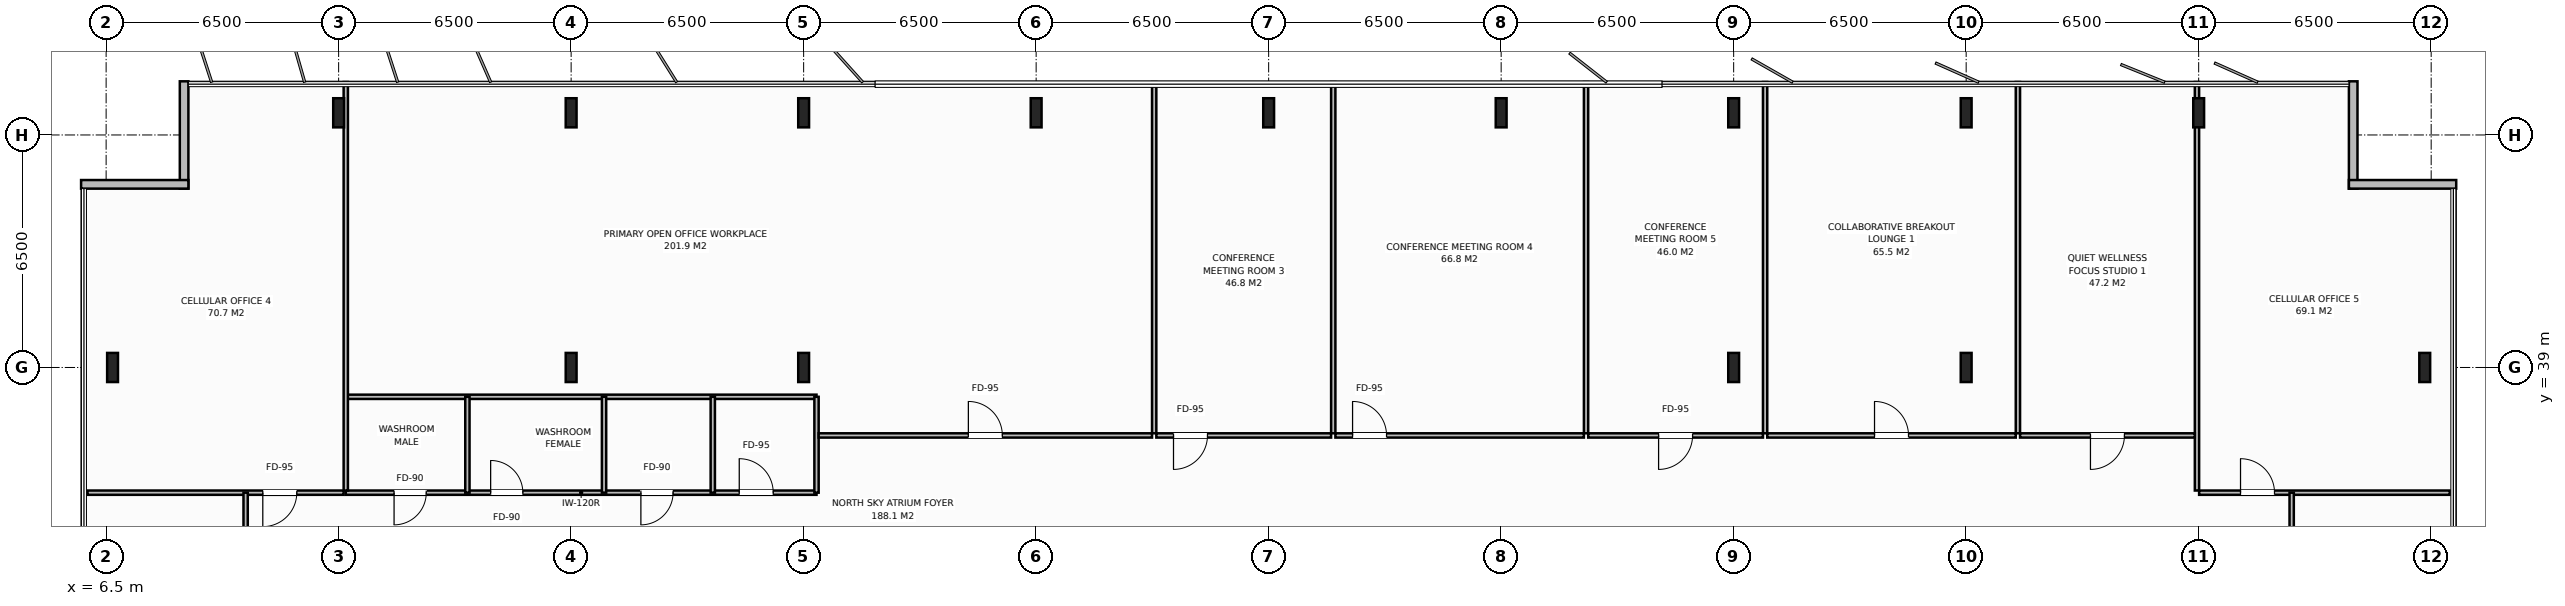
"""IFC4 building model, lengths in metres.
Left out: names, types, materials, properties, quantities, classifications, styles, units other than length and angle.
Written with IfcOpenShell. Run it as: python <this file> out.ifc"""

import sys

from ifc_helpers import new_model, si_unit, direction, frame, frame_2d, origin, origin_2d, place, context, subcontext, project, spatial, rectangle, i_section, extrude, element, fill, save


model = new_model("IFC4")
c1 = context("Model", 3, precision=1e-05, world=origin(), true_north=direction((0.0, 1.0)))
c2 = subcontext(c1, "Body", "Model", "MODEL_VIEW")
j1 = project(units=[si_unit("LENGTHUNIT", "METRE"), si_unit("PLANEANGLEUNIT", "RADIAN")], contexts=[c1])
p1 = place(None, origin())
s1 = spatial("IfcSite", under=j1, at=p1, CompositionType="ELEMENT")
p2 = place(p1, origin())
s2 = spatial("IfcBuilding", under=s1, at=p2, CompositionType="ELEMENT")
p3 = place(p2, frame((0.0, 0.0, 229.0)))
s3 = spatial("IfcBuildingStorey", under=s2, at=p3, CompositionType="ELEMENT", Elevation=229.0)
for number, where, z_axis, x_axis in (
    (1, (19.5, 39.0, 0.0), (0.0, 0.0, 1.0), (1.0, 0.0, 0.0)),
    (2, (58.5, 39.0, 0.0), (0.0, 0.0, 1.0), (1.0, 0.0, 0.0)),
    (3, (26.0, 39.0, 0.0), (0.0, 0.0, 1.0), (1.0, 0.0, 0.0)),
    (4, (52.0, 39.0, 0.0), (0.0, 0.0, 1.0), (1.0, 0.0, 0.0)),
    (5, (13.0, 46.12, 0.0), (0.0, 0.0, 1.0), (1.0, 0.0, 0.0)),
    (6, (19.5, 46.12, 0.0), (0.0, 0.0, 1.0), (1.0, 0.0, 0.0)),
    (7, (26.0, 46.12, 0.0), (0.0, 0.0, 1.0), (1.0, 0.0, 0.0)),
    (8, (32.5, 46.12, 0.0), (0.0, 0.0, 1.0), (1.0, 0.0, 0.0)),
    (9, (39.0, 46.12, 0.0), (0.0, 0.0, 1.0), (1.0, 0.0, 0.0)),
    (10, (45.5, 46.12, 0.0), (0.0, 0.0, 1.0), (1.0, 0.0, 0.0)),
    (11, (52.0, 46.12, 0.0), (0.0, 0.0, 1.0), (1.0, 0.0, 0.0)),
    (12, (58.5, 46.12, 0.0), (0.0, 0.0, 1.0), (1.0, 0.0, 0.0)),
    (13, (65.0, 46.12, 0.0), (0.0, 0.0, 1.0), (1.0, 0.0, 0.0)),
    (14, (6.68, 39.0, 0.0), (0.0, 0.0, 1.0), (1.0, 0.0, 0.0)),
    (15, (71.32, 39.0, 0.0), (0.0, 0.0, 1.0), (1.0, 0.0, 0.0)),
):
    element("IfcColumn", number, at=place(p3, frame(where, z_axis=z_axis, x_axis=x_axis)), inside=s3, PredefinedType="COLUMN", context=c2, shape_type="SweptSolid", body=[
        extrude(i_section(OverallWidth=0.303, OverallDepth=0.814, WebThickness=0.021, FlangeThickness=0.04, at=origin_2d()), origin(), (0.0, 0.0, 1.0), 3.8),
    ])
for number, where, z_axis, x_axis in (
    (16, (8.68, 44.0, 0.0), (0.0, 0.0, 1.0), (0.0, 1.0, 0.0)),
    (17, (5.8, 44.12, 0.0), (0.0, 0.0, 1.0), (1.0, 0.0, 0.0)),
    (18, (69.32, 47.0, 0.0), (0.0, 0.0, 1.0), (0.0, -1.0, 0.0)),
    (19, (69.2, 44.12, 0.0), (0.0, 0.0, 1.0), (1.0, 0.0, 0.0)),
):
    element("IfcWall", number, at=place(p3, frame(where, z_axis=z_axis, x_axis=x_axis)), inside=s3, PredefinedType="STANDARD", context=c2, shape_type="SweptSolid", body=[
        extrude(rectangle(XDim=3.0, YDim=0.24, at=frame_2d((1.5, 0.0))), origin(), (0.0, 0.0, 1.0), 3.58),
    ])
p4 = place(p3, frame((13.2, 35.5, 0.0), z_axis=(0.0, 0.0, 1.0), x_axis=(1.0, 0.0, 0.0)))
e20 = element("IfcWall", 20, at=p4, inside=s3, PredefinedType="PARTITIONING", context=c2, shape_type="SweptSolid", body=[
    extrude(rectangle(XDim=13.16, YDim=0.12, at=frame_2d((6.58, 0.0))), origin(), (0.0, 0.0, 1.0), 3.58),
])
p5 = place(p4, frame((1.35, 0.0, 0.0)))
e21 = element("IfcOpeningElement", 21, at=p5, cuts=e20, PredefinedType="OPENING", context=c2, shape_type="SweptSolid", body=[
    extrude(rectangle(XDim=0.9, YDim=2.15, at=frame_2d((0.45, 1.075))), frame((0.0, 0.07, 0.0), z_axis=(0.0, -1.0, 0.0), x_axis=(1.0, 0.0, 0.0)), (0.0, 0.0, 1.0), 0.14),
])
p6 = place(p4, frame((4.05, 0.0, 0.0)))
e22 = element("IfcOpeningElement", 22, at=p6, cuts=e20, PredefinedType="OPENING", context=c2, shape_type="SweptSolid", body=[
    extrude(rectangle(XDim=0.9, YDim=2.15, at=frame_2d((0.45, 1.075))), frame((0.0, 0.07, 0.0), z_axis=(0.0, -1.0, 0.0), x_axis=(1.0, 0.0, 0.0)), (0.0, 0.0, 1.0), 0.14),
])
p7 = place(p4, frame((8.25, 0.0, 0.0)))
e23 = element("IfcOpeningElement", 23, at=p7, cuts=e20, PredefinedType="OPENING", context=c2, shape_type="SweptSolid", body=[
    extrude(rectangle(XDim=0.9, YDim=2.15, at=frame_2d((0.45, 1.075))), frame((0.0, 0.07, 0.0), z_axis=(0.0, -1.0, 0.0), x_axis=(1.0, 0.0, 0.0)), (0.0, 0.0, 1.0), 0.14),
])
p8 = place(p4, frame((11.0, 0.0, 0.0)))
e24 = element("IfcOpeningElement", 24, at=p8, cuts=e20, PredefinedType="OPENING", context=c2, shape_type="SweptSolid", body=[
    extrude(rectangle(XDim=0.95, YDim=2.15, at=frame_2d((0.475, 1.075))), frame((0.0, 0.07, 0.0), z_axis=(0.0, -1.0, 0.0), x_axis=(1.0, 0.0, 0.0)), (0.0, 0.0, 1.0), 0.14),
])
p9 = place(p3, frame((13.2, 38.18, 0.0), z_axis=(0.0, 0.0, 1.0), x_axis=(1.0, 0.0, 0.0)))
e25 = element("IfcWall", 25, at=p9, inside=s3, PredefinedType="PARTITIONING", context=c2, shape_type="SweptSolid", body=[
    extrude(rectangle(XDim=13.16, YDim=0.12, at=frame_2d((6.58, 0.0))), origin(), (0.0, 0.0, 1.0), 3.58),
])
for number, where, z_axis, x_axis in (
    (26, (16.6, 35.5, 0.0), (0.0, 0.0, 1.0), (0.0, 1.0, 0.0)),
    (27, (20.42, 35.5, 0.0), (0.0, 0.0, 1.0), (0.0, 1.0, 0.0)),
    (28, (23.46, 35.5, 0.0), (0.0, 0.0, 1.0), (0.0, 1.0, 0.0)),
    (29, (26.36, 35.5, 0.0), (0.0, 0.0, 1.0), (0.0, 1.0, 0.0)),
):
    element("IfcWall", number, at=place(p3, frame(where, z_axis=z_axis, x_axis=x_axis)), inside=s3, PredefinedType="PARTITIONING", context=c2, shape_type="SweptSolid", body=[
        extrude(rectangle(XDim=2.68, YDim=0.12, at=frame_2d((1.34, 0.0))), origin(), (0.0, 0.0, 1.0), 3.58),
    ])
p10 = place(p3, frame((13.2, 35.56, 0.0), z_axis=(0.0, 0.0, 1.0), x_axis=(0.0, 1.0, 0.0)))
e30 = element("IfcWall", 30, at=p10, inside=s3, PredefinedType="PARTITIONING", context=c2, shape_type="SweptSolid", body=[
    extrude(rectangle(XDim=11.42, YDim=0.12, at=frame_2d((5.71, 0.0))), origin(), (0.0, 0.0, 1.0), 2.88),
])
p11 = place(p3, frame((5.98, 35.5, 0.0), z_axis=(0.0, 0.0, 1.0), x_axis=(1.0, 0.0, 0.0)))
e31 = element("IfcWall", 31, at=p11, inside=s3, PredefinedType="PARTITIONING", context=c2, shape_type="SweptSolid", body=[
    extrude(rectangle(XDim=7.16, YDim=0.12, at=frame_2d((3.58, 0.0))), origin(), (0.0, 0.0, 1.0), 3.58),
])
p12 = place(p11, frame((4.9, 0.0, 0.0)))
e32 = element("IfcOpeningElement", 32, at=p12, cuts=e31, PredefinedType="OPENING", context=c2, shape_type="SweptSolid", body=[
    extrude(rectangle(XDim=0.95, YDim=2.15, at=frame_2d((0.475, 1.075))), frame((0.0, 0.07, 0.0), z_axis=(0.0, -1.0, 0.0), x_axis=(1.0, 0.0, 0.0)), (0.0, 0.0, 1.0), 0.14),
])
p13 = place(p3, frame((35.8, 37.16, 0.0), z_axis=(0.0, 0.0, 1.0), x_axis=(0.0, 1.0, 0.0)))
e33 = element("IfcWall", 33, at=p13, inside=s3, PredefinedType="PARTITIONING", context=c2, shape_type="SweptSolid", body=[
    extrude(rectangle(XDim=9.82, YDim=0.12, at=frame_2d((4.91, 0.0))), origin(), (0.0, 0.0, 1.0), 3.58),
])
p14 = place(p3, frame((26.42, 37.1, 0.0), z_axis=(0.0, 0.0, 1.0), x_axis=(1.0, 0.0, 0.0)))
e34 = element("IfcWall", 34, at=p14, inside=s3, PredefinedType="PARTITIONING", context=c2, shape_type="SweptSolid", body=[
    extrude(rectangle(XDim=9.32, YDim=0.12, at=frame_2d((4.66, 0.0))), origin(), (0.0, 0.0, 1.0), 3.58),
])
p15 = place(p14, frame((4.185, 0.0, 0.0)))
e35 = element("IfcOpeningElement", 35, at=p15, cuts=e34, PredefinedType="OPENING", context=c2, shape_type="SweptSolid", body=[
    extrude(rectangle(XDim=0.95, YDim=2.15, at=frame_2d((0.475, 1.075))), frame((0.0, 0.07, 0.0), z_axis=(0.0, -1.0, 0.0), x_axis=(1.0, 0.0, 0.0)), (0.0, 0.0, 1.0), 0.14),
])
p16 = place(p3, frame((40.806, 37.16, 0.0), z_axis=(0.0, 0.0, 1.0), x_axis=(0.0, 1.0, 0.0)))
e36 = element("IfcWall", 36, at=p16, inside=s3, PredefinedType="PARTITIONING", context=c2, shape_type="SweptSolid", body=[
    extrude(rectangle(XDim=9.82, YDim=0.12, at=frame_2d((4.91, 0.0))), origin(), (0.0, 0.0, 1.0), 3.58),
])
p17 = place(p3, frame((35.86, 37.1, 0.0), z_axis=(0.0, 0.0, 1.0), x_axis=(1.0, 0.0, 0.0)))
e37 = element("IfcWall", 37, at=p17, inside=s3, PredefinedType="PARTITIONING", context=c2, shape_type="SweptSolid", body=[
    extrude(rectangle(XDim=4.886, YDim=0.12, at=frame_2d((2.443, 0.0))), origin(), (0.0, 0.0, 1.0), 3.58),
])
p18 = place(p17, frame((0.48, 0.0, 0.0)))
e38 = element("IfcOpeningElement", 38, at=p18, cuts=e37, PredefinedType="OPENING", context=c2, shape_type="SweptSolid", body=[
    extrude(rectangle(XDim=0.95, YDim=2.15, at=frame_2d((0.475, 1.075))), frame((0.0, 0.07, 0.0), z_axis=(0.0, -1.0, 0.0), x_axis=(1.0, 0.0, 0.0)), (0.0, 0.0, 1.0), 0.14),
])
p19 = place(p3, frame((47.873, 37.16, 0.0), z_axis=(0.0, 0.0, 1.0), x_axis=(0.0, 1.0, 0.0)))
e39 = element("IfcWall", 39, at=p19, inside=s3, PredefinedType="PARTITIONING", context=c2, shape_type="SweptSolid", body=[
    extrude(rectangle(XDim=9.82, YDim=0.12, at=frame_2d((4.91, 0.0))), origin(), (0.0, 0.0, 1.0), 3.58),
])
p20 = place(p3, frame((40.866, 37.1, 0.0), z_axis=(0.0, 0.0, 1.0), x_axis=(1.0, 0.0, 0.0)))
e40 = element("IfcWall", 40, at=p20, inside=s3, PredefinedType="PARTITIONING", context=c2, shape_type="SweptSolid", body=[
    extrude(rectangle(XDim=6.947, YDim=0.12, at=frame_2d((3.474, 0.0))), origin(), (0.0, 0.0, 1.0), 3.58),
])
p21 = place(p20, frame((0.48, 0.0, 0.0)))
e41 = element("IfcOpeningElement", 41, at=p21, cuts=e40, PredefinedType="OPENING", context=c2, shape_type="SweptSolid", body=[
    extrude(rectangle(XDim=0.95, YDim=2.15, at=frame_2d((0.475, 1.075))), frame((0.0, 0.07, 0.0), z_axis=(0.0, -1.0, 0.0), x_axis=(1.0, 0.0, 0.0)), (0.0, 0.0, 1.0), 0.14),
])
p22 = place(p3, frame((52.879, 37.16, 0.0), z_axis=(0.0, 0.0, 1.0), x_axis=(0.0, 1.0, 0.0)))
e42 = element("IfcWall", 42, at=p22, inside=s3, PredefinedType="PARTITIONING", context=c2, shape_type="SweptSolid", body=[
    extrude(rectangle(XDim=9.82, YDim=0.12, at=frame_2d((4.91, 0.0))), origin(), (0.0, 0.0, 1.0), 3.58),
])
p23 = place(p3, frame((47.933, 37.1, 0.0), z_axis=(0.0, 0.0, 1.0), x_axis=(1.0, 0.0, 0.0)))
e43 = element("IfcWall", 43, at=p23, inside=s3, PredefinedType="PARTITIONING", context=c2, shape_type="SweptSolid", body=[
    extrude(rectangle(XDim=4.886, YDim=0.12, at=frame_2d((2.443, 0.0))), origin(), (0.0, 0.0, 1.0), 3.58),
])
p24 = place(p23, frame((1.968, 0.0, 0.0)))
e44 = element("IfcOpeningElement", 44, at=p24, cuts=e43, PredefinedType="OPENING", context=c2, shape_type="SweptSolid", body=[
    extrude(rectangle(XDim=0.95, YDim=2.15, at=frame_2d((0.475, 1.075))), frame((0.0, 0.07, 0.0), z_axis=(0.0, -1.0, 0.0), x_axis=(1.0, 0.0, 0.0)), (0.0, 0.0, 1.0), 0.14),
])
p25 = place(p3, frame((59.947, 37.16, 0.0), z_axis=(0.0, 0.0, 1.0), x_axis=(0.0, 1.0, 0.0)))
e45 = element("IfcWall", 45, at=p25, inside=s3, PredefinedType="PARTITIONING", context=c2, shape_type="SweptSolid", body=[
    extrude(rectangle(XDim=9.82, YDim=0.12, at=frame_2d((4.91, 0.0))), origin(), (0.0, 0.0, 1.0), 3.58),
])
p26 = place(p3, frame((52.939, 37.1, 0.0), z_axis=(0.0, 0.0, 1.0), x_axis=(1.0, 0.0, 0.0)))
e46 = element("IfcWall", 46, at=p26, inside=s3, PredefinedType="PARTITIONING", context=c2, shape_type="SweptSolid", body=[
    extrude(rectangle(XDim=6.948, YDim=0.12, at=frame_2d((3.474, 0.0))), origin(), (0.0, 0.0, 1.0), 3.58),
])
p27 = place(p26, frame((2.999, 0.0, 0.0)))
e47 = element("IfcOpeningElement", 47, at=p27, cuts=e46, PredefinedType="OPENING", context=c2, shape_type="SweptSolid", body=[
    extrude(rectangle(XDim=0.95, YDim=2.15, at=frame_2d((0.475, 1.075))), frame((0.0, 0.07, 0.0), z_axis=(0.0, -1.0, 0.0), x_axis=(1.0, 0.0, 0.0)), (0.0, 0.0, 1.0), 0.14),
])
p28 = place(p3, frame((64.953, 35.56, 0.0), z_axis=(0.0, 0.0, 1.0), x_axis=(0.0, 1.0, 0.0)))
e48 = element("IfcWall", 48, at=p28, inside=s3, PredefinedType="PARTITIONING", context=c2, shape_type="SweptSolid", body=[
    extrude(rectangle(XDim=11.42, YDim=0.12, at=frame_2d((5.71, 0.0))), origin(), (0.0, 0.0, 1.0), 2.88),
])
p29 = place(p3, frame((60.007, 37.1, 0.0), z_axis=(0.0, 0.0, 1.0), x_axis=(1.0, 0.0, 0.0)))
e49 = element("IfcWall", 49, at=p29, inside=s3, PredefinedType="PARTITIONING", context=c2, shape_type="SweptSolid", body=[
    extrude(rectangle(XDim=4.886, YDim=0.12, at=frame_2d((2.443, 0.0))), origin(), (0.0, 0.0, 1.0), 3.58),
])
p30 = place(p29, frame((1.968, 0.0, 0.0)))
e50 = element("IfcOpeningElement", 50, at=p30, cuts=e49, PredefinedType="OPENING", context=c2, shape_type="SweptSolid", body=[
    extrude(rectangle(XDim=0.95, YDim=2.15, at=frame_2d((0.475, 1.075))), frame((0.0, 0.07, 0.0), z_axis=(0.0, -1.0, 0.0), x_axis=(1.0, 0.0, 0.0)), (0.0, 0.0, 1.0), 0.14),
])
p31 = place(p3, frame((65.013, 35.5, 0.0), z_axis=(0.0, 0.0, 1.0), x_axis=(1.0, 0.0, 0.0)))
e51 = element("IfcWall", 51, at=p31, inside=s3, PredefinedType="PARTITIONING", context=c2, shape_type="SweptSolid", body=[
    extrude(rectangle(XDim=7.007, YDim=0.12, at=frame_2d((3.504, 0.0))), origin(), (0.0, 0.0, 1.0), 3.58),
])
p32 = place(p31, frame((1.157, 0.0, 0.0)))
e52 = element("IfcOpeningElement", 52, at=p32, cuts=e51, PredefinedType="OPENING", context=c2, shape_type="SweptSolid", body=[
    extrude(rectangle(XDim=0.95, YDim=2.15, at=frame_2d((0.475, 1.075))), frame((0.0, 0.07, 0.0), z_axis=(0.0, -1.0, 0.0), x_axis=(1.0, 0.0, 0.0)), (0.0, 0.0, 1.0), 0.14),
])
p33 = place(p3, frame((10.4, 29.167, 0.0), z_axis=(0.0, 0.0, 1.0), x_axis=(0.0, 1.0, 0.0)))
e53 = element("IfcWall", 53, at=p33, inside=s3, PredefinedType="PARTITIONING", context=c2, shape_type="SweptSolid", body=[
    extrude(rectangle(XDim=6.333, YDim=0.12, at=frame_2d((3.167, 0.0))), origin(), (0.0, 0.0, 1.0), 3.58),
])
p34 = place(p33, frame((1.642, 0.0, 0.0)))
e54 = element("IfcOpeningElement", 54, at=p34, cuts=e53, PredefinedType="OPENING", context=c2, shape_type="SweptSolid", body=[
    extrude(rectangle(XDim=0.95, YDim=2.15, at=frame_2d((0.475, 1.075))), frame((0.0, 0.07, 0.0), z_axis=(0.0, -1.0, 0.0), x_axis=(1.0, 0.0, 0.0)), (0.0, 0.0, 1.0), 0.14),
])
p35 = place(p3, frame((67.6, 16.5, 0.0), z_axis=(0.0, 0.0, 1.0), x_axis=(0.0, 1.0, 0.0)))
e55 = element("IfcWall", 55, at=p35, inside=s3, PredefinedType="PARTITIONING", context=c2, shape_type="SweptSolid", body=[
    extrude(rectangle(XDim=19.0, YDim=0.12, at=frame_2d((9.5, 0.0))), origin(), (0.0, 0.0, 1.0), 3.58),
])
p36 = place(p35, frame((9.025, 0.0, 0.0)))
e56 = element("IfcOpeningElement", 56, at=p36, cuts=e55, PredefinedType="OPENING", context=c2, shape_type="SweptSolid", body=[
    extrude(rectangle(XDim=0.95, YDim=2.15, at=frame_2d((0.475, 1.075))), frame((0.0, 0.07, 0.0), z_axis=(0.0, -1.0, 0.0), x_axis=(1.0, 0.0, 0.0)), (0.0, 0.0, 1.0), 0.14),
])
p37 = place(p5, origin())
e57 = element("IfcDoor", 57, at=p37, inside=s3, OperationType="SINGLE_SWING_RIGHT", PredefinedType="DOOR", context=c2, shape_type="SweptSolid", body=[
    extrude(rectangle(XDim=0.9, YDim=2.15, at=frame_2d((0.45, 1.075))), frame((0.0, 0.025, 0.0), z_axis=(0.0, -1.0, 0.0), x_axis=(1.0, 0.0, 0.0)), (0.0, 0.0, 1.0), 0.05),
])
fill(e21, e57)
p38 = place(p6, origin())
e58 = element("IfcDoor", 58, at=p38, inside=s3, OperationType="SINGLE_SWING_LEFT", PredefinedType="DOOR", context=c2, shape_type="SweptSolid", body=[
    extrude(rectangle(XDim=0.9, YDim=2.15, at=frame_2d((0.45, 1.075))), frame((0.0, 0.025, 0.0), z_axis=(0.0, -1.0, 0.0), x_axis=(1.0, 0.0, 0.0)), (0.0, 0.0, 1.0), 0.05),
])
fill(e22, e58)
p39 = place(p7, origin())
e59 = element("IfcDoor", 59, at=p39, inside=s3, OperationType="SINGLE_SWING_RIGHT", PredefinedType="DOOR", context=c2, shape_type="SweptSolid", body=[
    extrude(rectangle(XDim=0.9, YDim=2.15, at=frame_2d((0.45, 1.075))), frame((0.0, 0.025, 0.0), z_axis=(0.0, -1.0, 0.0), x_axis=(1.0, 0.0, 0.0)), (0.0, 0.0, 1.0), 0.05),
])
fill(e23, e59)
p40 = place(p8, origin())
e60 = element("IfcDoor", 60, at=p40, inside=s3, OperationType="SINGLE_SWING_LEFT", PredefinedType="DOOR", context=c2, shape_type="SweptSolid", body=[
    extrude(rectangle(XDim=0.95, YDim=2.15, at=frame_2d((0.475, 1.075))), frame((0.0, 0.025, 0.0), z_axis=(0.0, -1.0, 0.0), x_axis=(1.0, 0.0, 0.0)), (0.0, 0.0, 1.0), 0.05),
])
fill(e24, e60)
p41 = place(p12, origin())
e61 = element("IfcDoor", 61, at=p41, inside=s3, OperationType="SINGLE_SWING_RIGHT", PredefinedType="DOOR", context=c2, shape_type="SweptSolid", body=[
    extrude(rectangle(XDim=0.95, YDim=2.15, at=frame_2d((0.475, 1.075))), frame((0.0, 0.025, 0.0), z_axis=(0.0, -1.0, 0.0), x_axis=(1.0, 0.0, 0.0)), (0.0, 0.0, 1.0), 0.05),
])
fill(e32, e61)
p42 = place(p15, origin())
e62 = element("IfcDoor", 62, at=p42, inside=s3, OperationType="SINGLE_SWING_LEFT", PredefinedType="DOOR", context=c2, shape_type="SweptSolid", body=[
    extrude(rectangle(XDim=0.95, YDim=2.15, at=frame_2d((0.475, 1.075))), frame((0.0, 0.025, 0.0), z_axis=(0.0, -1.0, 0.0), x_axis=(1.0, 0.0, 0.0)), (0.0, 0.0, 1.0), 0.05),
])
fill(e35, e62)
p43 = place(p18, origin())
e63 = element("IfcDoor", 63, at=p43, inside=s3, OperationType="SINGLE_SWING_RIGHT", PredefinedType="DOOR", context=c2, shape_type="SweptSolid", body=[
    extrude(rectangle(XDim=0.95, YDim=2.15, at=frame_2d((0.475, 1.075))), frame((0.0, 0.025, 0.0), z_axis=(0.0, -1.0, 0.0), x_axis=(1.0, 0.0, 0.0)), (0.0, 0.0, 1.0), 0.05),
])
fill(e38, e63)
p44 = place(p21, origin())
e64 = element("IfcDoor", 64, at=p44, inside=s3, OperationType="SINGLE_SWING_LEFT", PredefinedType="DOOR", context=c2, shape_type="SweptSolid", body=[
    extrude(rectangle(XDim=0.95, YDim=2.15, at=frame_2d((0.475, 1.075))), frame((0.0, 0.025, 0.0), z_axis=(0.0, -1.0, 0.0), x_axis=(1.0, 0.0, 0.0)), (0.0, 0.0, 1.0), 0.05),
])
fill(e41, e64)
p45 = place(p24, origin())
e65 = element("IfcDoor", 65, at=p45, inside=s3, OperationType="SINGLE_SWING_RIGHT", PredefinedType="DOOR", context=c2, shape_type="SweptSolid", body=[
    extrude(rectangle(XDim=0.95, YDim=2.15, at=frame_2d((0.475, 1.075))), frame((0.0, 0.025, 0.0), z_axis=(0.0, -1.0, 0.0), x_axis=(1.0, 0.0, 0.0)), (0.0, 0.0, 1.0), 0.05),
])
fill(e44, e65)
p46 = place(p27, origin())
e66 = element("IfcDoor", 66, at=p46, inside=s3, OperationType="SINGLE_SWING_LEFT", PredefinedType="DOOR", context=c2, shape_type="SweptSolid", body=[
    extrude(rectangle(XDim=0.95, YDim=2.15, at=frame_2d((0.475, 1.075))), frame((0.0, 0.025, 0.0), z_axis=(0.0, -1.0, 0.0), x_axis=(1.0, 0.0, 0.0)), (0.0, 0.0, 1.0), 0.05),
])
fill(e47, e66)
p47 = place(p30, origin())
e67 = element("IfcDoor", 67, at=p47, inside=s3, OperationType="SINGLE_SWING_RIGHT", PredefinedType="DOOR", context=c2, shape_type="SweptSolid", body=[
    extrude(rectangle(XDim=0.95, YDim=2.15, at=frame_2d((0.475, 1.075))), frame((0.0, 0.025, 0.0), z_axis=(0.0, -1.0, 0.0), x_axis=(1.0, 0.0, 0.0)), (0.0, 0.0, 1.0), 0.05),
])
fill(e50, e67)
p48 = place(p32, origin())
e68 = element("IfcDoor", 68, at=p48, inside=s3, OperationType="SINGLE_SWING_LEFT", PredefinedType="DOOR", context=c2, shape_type="SweptSolid", body=[
    extrude(rectangle(XDim=0.95, YDim=2.15, at=frame_2d((0.475, 1.075))), frame((0.0, 0.025, 0.0), z_axis=(0.0, -1.0, 0.0), x_axis=(1.0, 0.0, 0.0)), (0.0, 0.0, 1.0), 0.05),
])
fill(e52, e68)
save(model, sys.argv[1])
